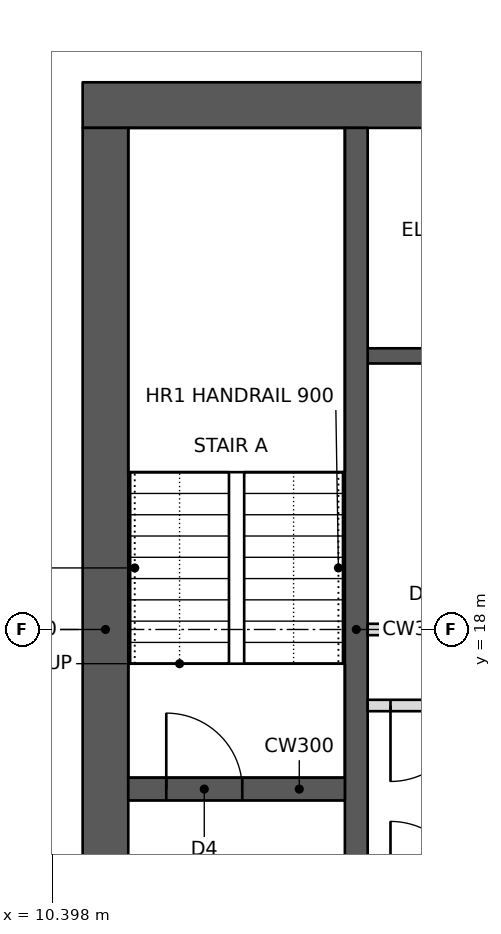
"""IFC4 building model, lengths in metres.
Left out: names, types, materials, properties, quantities, classifications, styles, units other than length and angle.
Written with IfcOpenShell. Run it as: python <this file> out.ifc"""

import sys

from ifc_helpers import new_model, si_unit, direction, frame, frame_2d, origin, place, context, subcontext, project, spatial, rectangle, extrude, element, fill, save


model = new_model("IFC4")
c1 = context("Model", 3, precision=1e-05, world=origin(), true_north=direction((0.0, 1.0)))
c2 = subcontext(c1, "Body", "Model", "MODEL_VIEW")
j1 = project(units=[si_unit("LENGTHUNIT", "METRE"), si_unit("PLANEANGLEUNIT", "RADIAN")], contexts=[c1])
p1 = place(None, origin())
s1 = spatial("IfcSite", under=j1, at=p1, CompositionType="ELEMENT")
p2 = place(p1, origin())
s2 = spatial("IfcBuilding", under=s1, at=p2, CompositionType="ELEMENT")
p3 = place(p2, frame((0.0, 0.0, 201.2)))
s3 = spatial("IfcBuildingStorey", under=s2, at=p3, CompositionType="ELEMENT", Elevation=201.2)
p4 = place(p3, frame((10.8, 24.9, 0.0), z_axis=(0.0, 0.0, 1.0), x_axis=(1.0, 0.0, 0.0)))
e1 = element("IfcWall", 1, at=p4, inside=s3, PredefinedType="SHEAR", context=c2, shape_type="SweptSolid", body=[
    extrude(rectangle(XDim=23.4, YDim=0.6, at=frame_2d((11.7, 0.0))), origin(), (0.0, 0.0, 1.0), 3.4),
])
p5 = place(p4, frame((17.2, 0.0, 0.0)))
e2 = element("IfcOpeningElement", 2, at=p5, cuts=e1, PredefinedType="OPENING", context=c2, shape_type="SweptSolid", body=[
    extrude(rectangle(XDim=1.8, YDim=2.1, at=frame_2d((0.9, 1.05))), frame((0.0, 0.31, 0.0), z_axis=(0.0, -1.0, 0.0), x_axis=(1.0, 0.0, 0.0)), (0.0, 0.0, 1.0), 0.62),
])
p6 = place(p4, frame((21.1, 0.0, 0.0)))
e3 = element("IfcOpeningElement", 3, at=p6, cuts=e1, PredefinedType="OPENING", context=c2, shape_type="SweptSolid", body=[
    extrude(rectangle(XDim=1.0, YDim=2.1, at=frame_2d((0.5, 1.05))), frame((0.0, 0.31, 0.0), z_axis=(0.0, -1.0, 0.0), x_axis=(1.0, 0.0, 0.0)), (0.0, 0.0, 1.0), 0.62),
])
p7 = place(p4, frame((4.9, 0.0, 0.0)))
e4 = element("IfcOpeningElement", 4, at=p7, cuts=e1, PredefinedType="OPENING", context=c2, shape_type="SweptSolid", body=[
    extrude(rectangle(XDim=1.0, YDim=2.1, at=frame_2d((0.5, 1.05))), frame((0.0, 0.31, 0.0), z_axis=(0.0, -1.0, 0.0), x_axis=(1.0, 0.0, 0.0)), (0.0, 0.0, 1.0), 0.62),
])
p8 = place(p3, frame((11.1, 11.4, 0.0), z_axis=(0.0, 0.0, 1.0), x_axis=(0.0, 1.0, 0.0)))
e5 = element("IfcWall", 5, at=p8, inside=s3, PredefinedType="SHEAR", context=c2, shape_type="SweptSolid", body=[
    extrude(rectangle(XDim=13.2, YDim=0.6, at=frame_2d((6.6, 0.0))), origin(), (0.0, 0.0, 1.0), 3.4),
])
p9 = place(p3, frame((14.4, 11.4, 0.0), z_axis=(0.0, 0.0, 1.0), x_axis=(0.0, 1.0, 0.0)))
e6 = element("IfcWall", 6, at=p9, inside=s3, PredefinedType="SHEAR", context=c2, shape_type="SweptSolid", body=[
    extrude(rectangle(XDim=13.2, YDim=0.3, at=frame_2d((6.6, 0.0))), origin(), (0.0, 0.0, 1.0), 3.4),
])
p10 = place(p3, frame((11.4, 15.9, 0.0), z_axis=(0.0, 0.0, 1.0), x_axis=(1.0, 0.0, 0.0)))
e7 = element("IfcWall", 7, at=p10, inside=s3, PredefinedType="SHEAR", context=c2, shape_type="SweptSolid", body=[
    extrude(rectangle(XDim=2.85, YDim=0.3, at=frame_2d((1.425, 0.0))), origin(), (0.0, 0.0, 1.0), 3.4),
])
p11 = place(p10, frame((0.5, 0.0, 0.0)))
e8 = element("IfcOpeningElement", 8, at=p11, cuts=e7, PredefinedType="OPENING", context=c2, shape_type="SweptSolid", body=[
    extrude(rectangle(XDim=1.0, YDim=2.1, at=frame_2d((0.5, 1.05))), frame((0.0, 0.16, 0.0), z_axis=(0.0, -1.0, 0.0), x_axis=(1.0, 0.0, 0.0)), (0.0, 0.0, 1.0), 0.32),
])
p12 = place(p3, frame((14.55, 18.0, 0.0), z_axis=(0.0, 0.0, 1.0), x_axis=(1.0, 0.0, 0.0)))
e9 = element("IfcWall", 9, at=p12, inside=s3, PredefinedType="PARTITIONING", context=c2, shape_type="SweptSolid", body=[
    extrude(rectangle(XDim=3.3, YDim=0.15, at=frame_2d((1.65, 0.0))), origin(), (0.0, 0.0, 1.0), 3.2),
])
p13 = place(p3, frame((14.55, 21.6, 0.0), z_axis=(0.0, 0.0, 1.0), x_axis=(1.0, 0.0, 0.0)))
e10 = element("IfcWall", 10, at=p13, inside=s3, PredefinedType="SHEAR", context=c2, shape_type="SweptSolid", body=[
    extrude(rectangle(XDim=3.3, YDim=0.2, at=frame_2d((1.65, 0.0))), origin(), (0.0, 0.0, 1.0), 3.4),
])
p14 = place(p3, frame((14.55, 17.0, 0.0), z_axis=(0.0, 0.0, 1.0), x_axis=(1.0, 0.0, 0.0)))
e11 = element("IfcWall", 11, at=p14, inside=s3, PredefinedType="PARTITIONING", context=c2, shape_type="SweptSolid", body=[
    extrude(rectangle(XDim=3.3, YDim=0.15, at=frame_2d((1.65, 0.0))), origin(), (0.0, 0.0, 1.0), 3.2),
])
p15 = place(p14, frame((0.3, 0.0, 0.0)))
e12 = element("IfcOpeningElement", 12, at=p15, cuts=e11, PredefinedType="OPENING", context=c2, shape_type="SweptSolid", body=[
    extrude(rectangle(XDim=1.0, YDim=2.1, at=frame_2d((0.5, 1.05))), frame((0.0, 0.085, 0.0), z_axis=(0.0, -1.0, 0.0), x_axis=(1.0, 0.0, 0.0)), (0.0, 0.0, 1.0), 0.17),
])
p16 = place(p15, frame((1.0, 0.0, 0.0), z_axis=(0.0, 0.0, 1.0), x_axis=(-1.0, 0.0, 0.0)))
e13 = element("IfcDoor", 13, at=p16, inside=s3, OperationType="SINGLE_SWING_RIGHT", PredefinedType="DOOR", context=c2, shape_type="SweptSolid", body=[
    extrude(rectangle(XDim=1.0, YDim=2.1, at=frame_2d((0.5, 1.05))), frame((0.0, 0.025, 0.0), z_axis=(0.0, -1.0, 0.0), x_axis=(1.0, 0.0, 0.0)), (0.0, 0.0, 1.0), 0.05),
])
fill(e12, e13)
p17 = place(p11, origin())
e14 = element("IfcDoor", 14, at=p17, inside=s3, OperationType="SINGLE_SWING_LEFT", PredefinedType="DOOR", context=c2, shape_type="SweptSolid", body=[
    extrude(rectangle(XDim=1.0, YDim=2.1, at=frame_2d((0.5, 1.05))), frame((0.0, 0.025, 0.0), z_axis=(0.0, -1.0, 0.0), x_axis=(1.0, 0.0, 0.0)), (0.0, 0.0, 1.0), 0.05),
])
fill(e8, e14)
save(model, sys.argv[1])
